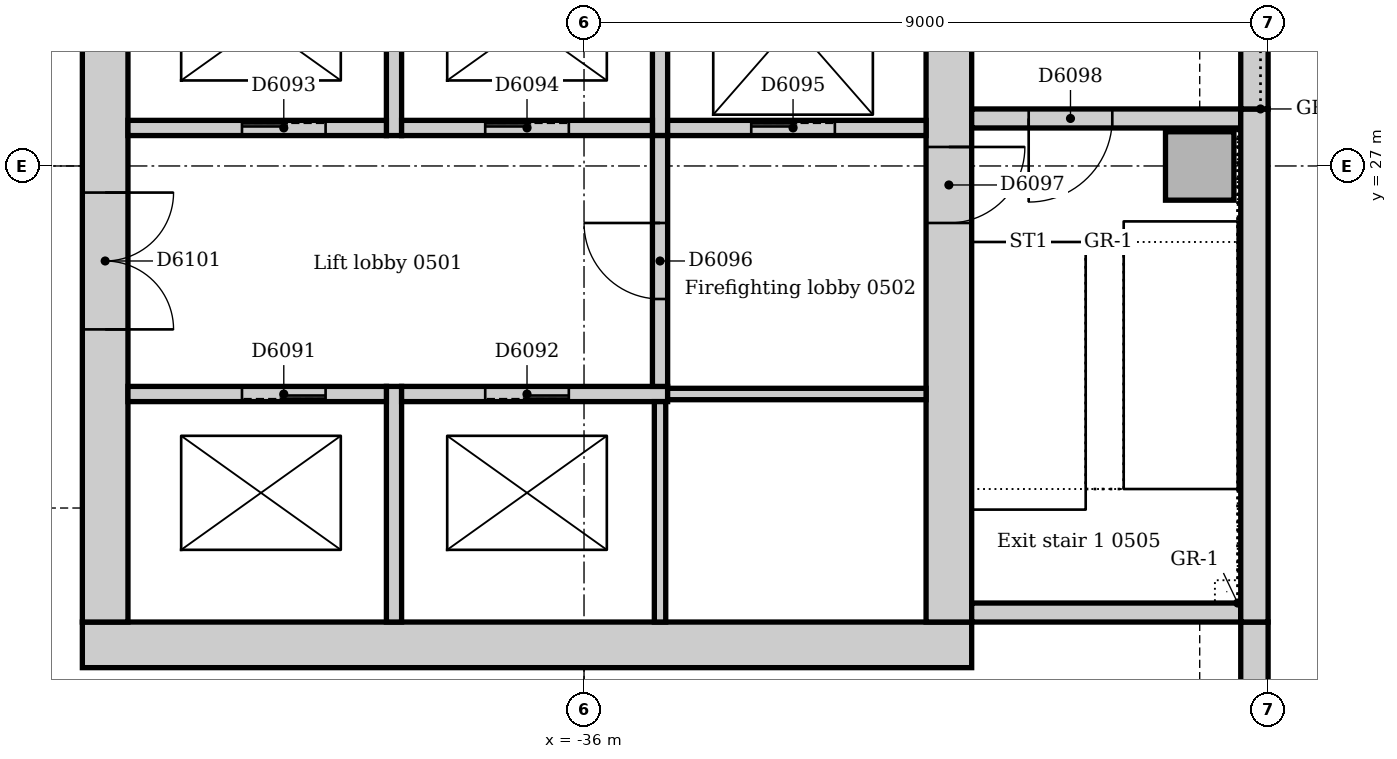
"""IFC4 building model, lengths in metres.
Left out: names, types, materials, properties, quantities, classifications, styles, units other than length and angle.
Written with IfcOpenShell. Run it as: python <this file> out.ifc"""

import sys

from ifc_helpers import new_model, si_unit, direction, frame, frame_2d, origin, origin_2d, place, context, subcontext, project, spatial, rectangle, extrude, element, fill, save


model = new_model("IFC4")
c1 = context("Model", 3, precision=1e-05, world=origin(), true_north=direction((0.0, 1.0)))
c2 = subcontext(c1, "Body", "Model", "MODEL_VIEW")
j1 = project(units=[si_unit("LENGTHUNIT", "METRE"), si_unit("PLANEANGLEUNIT", "RADIAN")], contexts=[c1])
p1 = place(None, origin())
s1 = spatial("IfcSite", under=j1, at=p1, CompositionType="ELEMENT")
p2 = place(p1, origin())
s2 = spatial("IfcBuilding", under=s1, at=p2, CompositionType="ELEMENT")
p3 = place(p2, frame((0.0, 0.0, 26.0)))
s3 = spatial("IfcBuildingStorey", under=s2, at=p3, CompositionType="ELEMENT", Elevation=26.0)
p4 = place(p3, frame((-42.6, 20.7, 0.0), z_axis=(0.0, 0.0, 1.0), x_axis=(1.0, 0.0, 0.0)))
e1 = element("IfcWall", 1, at=p4, inside=s3, PredefinedType="SOLIDWALL", context=c2, shape_type="SweptSolid", body=[
    extrude(rectangle(XDim=11.7, YDim=0.6, at=frame_2d((5.85, 0.0))), origin(), (0.0, 0.0, 1.0), 4.0),
])
p5 = place(p3, frame((-31.2, 21.0, 0.0), z_axis=(0.0, 0.0, 1.0), x_axis=(0.0, 1.0, 0.0)))
e2 = element("IfcWall", 2, at=p5, inside=s3, PredefinedType="SOLIDWALL", context=c2, shape_type="SweptSolid", body=[
    extrude(rectangle(XDim=9.5, YDim=0.6, at=frame_2d((4.75, 0.0))), origin(), (0.0, 0.0, 1.0), 4.0),
])
p6 = place(p5, frame((5.25, 0.0, 0.0)))
e3 = element("IfcOpeningElement", 3, at=p6, cuts=e2, PredefinedType="OPENING", context=c2, shape_type="SweptSolid", body=[
    extrude(rectangle(XDim=1.0, YDim=2.1, at=frame_2d((0.5, 1.05))), frame((0.0, 0.31, 0.0), z_axis=(0.0, -1.0, 0.0), x_axis=(1.0, 0.0, 0.0)), (0.0, 0.0, 1.0), 0.62),
])
p7 = place(p3, frame((-42.3, 30.5, 0.0), z_axis=(0.0, 0.0, 1.0), x_axis=(0.0, -1.0, 0.0)))
e4 = element("IfcWall", 4, at=p7, inside=s3, PredefinedType="SOLIDWALL", context=c2, shape_type="SweptSolid", body=[
    extrude(rectangle(XDim=9.5, YDim=0.6, at=frame_2d((4.75, 0.0))), origin(), (0.0, 0.0, 1.0), 4.0),
])
p8 = place(p7, frame((3.85, 0.0, 0.0)))
e5 = element("IfcOpeningElement", 5, at=p8, cuts=e4, PredefinedType="OPENING", context=c2, shape_type="SweptSolid", body=[
    extrude(rectangle(XDim=1.8, YDim=2.1, at=frame_2d((0.9, 1.05))), frame((0.0, 0.31, 0.0), z_axis=(0.0, -1.0, 0.0), x_axis=(1.0, 0.0, 0.0)), (0.0, 0.0, 1.0), 0.62),
])
p9 = place(p3, frame((-30.9, 21.125, 0.0), z_axis=(0.0, 0.0, 1.0), x_axis=(1.0, 0.0, 0.0)))
e6 = element("IfcWall", 6, at=p9, inside=s3, PredefinedType="SOLIDWALL", context=c2, shape_type="SweptSolid", body=[
    extrude(rectangle(XDim=3.54, YDim=0.25, at=frame_2d((1.77, 0.0))), origin(), (0.0, 0.0, 1.0), 4.0),
])
p10 = place(p3, frame((-27.36, 27.625, 0.0), z_axis=(0.0, 0.0, 1.0), x_axis=(-1.0, 0.0, 0.0)))
e7 = element("IfcWall", 7, at=p10, inside=s3, PredefinedType="SOLIDWALL", context=c2, shape_type="SweptSolid", body=[
    extrude(rectangle(XDim=3.54, YDim=0.25, at=frame_2d((1.77, 0.0))), origin(), (0.0, 0.0, 1.0), 4.0),
])
p11 = place(p10, frame((1.69, 0.0, 0.0)))
e8 = element("IfcOpeningElement", 8, at=p11, cuts=e7, PredefinedType="OPENING", context=c2, shape_type="SweptSolid", body=[
    extrude(rectangle(XDim=1.1, YDim=2.1, at=frame_2d((0.55, 1.05))), frame((0.0, 0.135, 0.0), z_axis=(0.0, -1.0, 0.0), x_axis=(1.0, 0.0, 0.0)), (0.0, 0.0, 1.0), 0.27),
])
p12 = place(p3, frame((-27.9, 27.0, 0.0), z_axis=(0.0, 0.0, 1.0), x_axis=(1.0, 0.0, 0.0)))
e9 = element("IfcColumn", 9, at=p12, inside=s3, PredefinedType="COLUMN", context=c2, shape_type="SweptSolid", body=[
    extrude(rectangle(XDim=0.9, YDim=0.9, at=origin_2d()), origin(), (0.0, 0.0, 1.0), 4.0),
])
p13 = place(p3, frame((-27.18, 8.743, 0.0), z_axis=(0.0, 0.0, 1.0), x_axis=(0.0, 1.0, 0.0)))
e10 = element("IfcWall", 10, at=p13, inside=s3, PredefinedType="STANDARD", context=c2, shape_type="SweptSolid", body=[
    extrude(rectangle(XDim=12.257, YDim=0.36, at=frame_2d((6.129, 0.0))), origin(), (0.0, 0.0, 1.0), 3.85),
])
p14 = place(p13, frame((2.607, 0.0, 0.9)))
e11 = element("IfcOpeningElement", 11, at=p14, cuts=e10, PredefinedType="OPENING", context=c2, shape_type="SweptSolid", body=[
    extrude(rectangle(XDim=3.3, YDim=1.6, at=frame_2d((1.65, 0.8))), frame((0.0, 0.19, 0.0), z_axis=(0.0, -1.0, 0.0), x_axis=(1.0, 0.0, 0.0)), (0.0, 0.0, 1.0), 0.38),
])
p15 = place(p13, frame((7.607, 0.0, 0.9)))
e12 = element("IfcOpeningElement", 12, at=p15, cuts=e10, PredefinedType="OPENING", context=c2, shape_type="SweptSolid", body=[
    extrude(rectangle(XDim=3.3, YDim=1.6, at=frame_2d((1.65, 0.8))), frame((0.0, 0.19, 0.0), z_axis=(0.0, -1.0, 0.0), x_axis=(1.0, 0.0, 0.0)), (0.0, 0.0, 1.0), 0.38),
])
p16 = place(p3, frame((-27.18, 21.0, 0.0), z_axis=(0.0, 0.0, 1.0), x_axis=(0.0, 1.0, 0.0)))
e13 = element("IfcWall", 13, at=p16, inside=s3, PredefinedType="STANDARD", context=c2, shape_type="SweptSolid", body=[
    extrude(rectangle(XDim=6.75, YDim=0.36, at=frame_2d((3.375, 0.0))), origin(), (0.0, 0.0, 1.0), 3.85),
])
p17 = place(p3, frame((-27.18, 27.75, 0.0), z_axis=(0.0, 0.0, 1.0), x_axis=(0.0, 1.0, 0.0)))
e14 = element("IfcWall", 14, at=p17, inside=s3, PredefinedType="STANDARD", context=c2, shape_type="SweptSolid", body=[
    extrude(rectangle(XDim=7.5, YDim=0.36, at=frame_2d((3.75, 0.0))), origin(), (0.0, 0.0, 1.0), 3.85),
])
p18 = place(p17, frame((2.85, 0.0, 1.2)))
e15 = element("IfcOpeningElement", 15, at=p18, cuts=e14, PredefinedType="OPENING", context=c2, shape_type="SweptSolid", body=[
    extrude(rectangle(XDim=1.8, YDim=1.2, at=frame_2d((0.9, 0.6))), frame((0.0, 0.19, 0.0), z_axis=(0.0, -1.0, 0.0), x_axis=(1.0, 0.0, 0.0)), (0.0, 0.0, 1.0), 0.38),
])
p19 = place(p3, frame((-38.5, 21.0, 0.0), z_axis=(0.0, 0.0, 1.0), x_axis=(0.0, 1.0, 0.0)))
e16 = element("IfcWall", 16, at=p19, inside=s3, PredefinedType="SOLIDWALL", context=c2, shape_type="SweptSolid", body=[
    extrude(rectangle(XDim=3.1, YDim=0.2, at=frame_2d((1.55, 0.0))), origin(), (0.0, 0.0, 1.0), 4.0),
])
p20 = place(p3, frame((-38.6, 24.0, 0.0), z_axis=(0.0, 0.0, 1.0), x_axis=(-1.0, 0.0, 0.0)))
e17 = element("IfcWall", 17, at=p20, inside=s3, PredefinedType="SOLIDWALL", context=c2, shape_type="SweptSolid", body=[
    extrude(rectangle(XDim=3.4, YDim=0.2, at=frame_2d((1.7, 0.0))), origin(), (0.0, 0.0, 1.0), 4.0),
])
p21 = place(p20, frame((0.8, 0.0, 0.0)))
e18 = element("IfcOpeningElement", 18, at=p21, cuts=e17, PredefinedType="OPENING", context=c2, shape_type="SweptSolid", body=[
    extrude(rectangle(XDim=1.1, YDim=2.1, at=frame_2d((0.55, 1.05))), frame((0.0, 0.11, 0.0), z_axis=(0.0, -1.0, 0.0), x_axis=(1.0, 0.0, 0.0)), (0.0, 0.0, 1.0), 0.22),
])
p22 = place(p3, frame((-34.9, 24.0, 0.0), z_axis=(0.0, 0.0, 1.0), x_axis=(-1.0, 0.0, 0.0)))
e19 = element("IfcWall", 19, at=p22, inside=s3, PredefinedType="SOLIDWALL", context=c2, shape_type="SweptSolid", body=[
    extrude(rectangle(XDim=3.5, YDim=0.2, at=frame_2d((1.75, 0.0))), origin(), (0.0, 0.0, 1.0), 4.0),
])
p23 = place(p22, frame((1.3, 0.0, 0.0)))
e20 = element("IfcOpeningElement", 20, at=p23, cuts=e19, PredefinedType="OPENING", context=c2, shape_type="SweptSolid", body=[
    extrude(rectangle(XDim=1.1, YDim=2.1, at=frame_2d((0.55, 1.05))), frame((0.0, 0.11, 0.0), z_axis=(0.0, -1.0, 0.0), x_axis=(1.0, 0.0, 0.0)), (0.0, 0.0, 1.0), 0.22),
])
p24 = place(p3, frame((-38.5, 27.4, 0.0), z_axis=(0.0, 0.0, 1.0), x_axis=(0.0, 1.0, 0.0)))
e21 = element("IfcWall", 21, at=p24, inside=s3, PredefinedType="SOLIDWALL", context=c2, shape_type="SweptSolid", body=[
    extrude(rectangle(XDim=2.85, YDim=0.2, at=frame_2d((1.425, 0.0))), origin(), (0.0, 0.0, 1.0), 4.0),
])
p25 = place(p3, frame((-42.0, 27.5, 0.0), z_axis=(0.0, 0.0, 1.0), x_axis=(1.0, 0.0, 0.0)))
e22 = element("IfcWall", 22, at=p25, inside=s3, PredefinedType="SOLIDWALL", context=c2, shape_type="SweptSolid", body=[
    extrude(rectangle(XDim=3.4, YDim=0.2, at=frame_2d((1.7, 0.0))), origin(), (0.0, 0.0, 1.0), 4.0),
])
p26 = place(p25, frame((1.5, 0.0, 0.0)))
e23 = element("IfcOpeningElement", 23, at=p26, cuts=e22, PredefinedType="OPENING", context=c2, shape_type="SweptSolid", body=[
    extrude(rectangle(XDim=1.1, YDim=2.1, at=frame_2d((0.55, 1.05))), frame((0.0, 0.11, 0.0), z_axis=(0.0, -1.0, 0.0), x_axis=(1.0, 0.0, 0.0)), (0.0, 0.0, 1.0), 0.22),
])
p27 = place(p3, frame((-35.0, 27.4, 0.0), z_axis=(0.0, 0.0, 1.0), x_axis=(0.0, 1.0, 0.0)))
e24 = element("IfcWall", 24, at=p27, inside=s3, PredefinedType="SOLIDWALL", context=c2, shape_type="SweptSolid", body=[
    extrude(rectangle(XDim=2.85, YDim=0.2, at=frame_2d((1.425, 0.0))), origin(), (0.0, 0.0, 1.0), 4.0),
])
p28 = place(p3, frame((-38.4, 27.5, 0.0), z_axis=(0.0, 0.0, 1.0), x_axis=(1.0, 0.0, 0.0)))
e25 = element("IfcWall", 25, at=p28, inside=s3, PredefinedType="SOLIDWALL", context=c2, shape_type="SweptSolid", body=[
    extrude(rectangle(XDim=3.3, YDim=0.2, at=frame_2d((1.65, 0.0))), origin(), (0.0, 0.0, 1.0), 4.0),
])
p29 = place(p28, frame((1.1, 0.0, 0.0)))
e26 = element("IfcOpeningElement", 26, at=p29, cuts=e25, PredefinedType="OPENING", context=c2, shape_type="SweptSolid", body=[
    extrude(rectangle(XDim=1.1, YDim=2.1, at=frame_2d((0.55, 1.05))), frame((0.0, 0.11, 0.0), z_axis=(0.0, -1.0, 0.0), x_axis=(1.0, 0.0, 0.0)), (0.0, 0.0, 1.0), 0.22),
])
p30 = place(p3, frame((-34.9, 27.5, 0.0), z_axis=(0.0, 0.0, 1.0), x_axis=(1.0, 0.0, 0.0)))
e27 = element("IfcWall", 27, at=p30, inside=s3, PredefinedType="SOLIDWALL", context=c2, shape_type="SweptSolid", body=[
    extrude(rectangle(XDim=3.4, YDim=0.2, at=frame_2d((1.7, 0.0))), origin(), (0.0, 0.0, 1.0), 4.0),
])
p31 = place(p30, frame((1.1, 0.0, 0.0)))
e28 = element("IfcOpeningElement", 28, at=p31, cuts=e27, PredefinedType="OPENING", context=c2, shape_type="SweptSolid", body=[
    extrude(rectangle(XDim=1.1, YDim=2.1, at=frame_2d((0.55, 1.05))), frame((0.0, 0.11, 0.0), z_axis=(0.0, -1.0, 0.0), x_axis=(1.0, 0.0, 0.0)), (0.0, 0.0, 1.0), 0.22),
])
p32 = place(p3, frame((-35.0, 24.1, 0.0), z_axis=(0.0, 0.0, 1.0), x_axis=(0.0, 1.0, 0.0)))
e29 = element("IfcWall", 29, at=p32, inside=s3, PredefinedType="SOLIDWALL", context=c2, shape_type="SweptSolid", body=[
    extrude(rectangle(XDim=3.3, YDim=0.2, at=frame_2d((1.65, 0.0))), origin(), (0.0, 0.0, 1.0), 4.0),
])
p33 = place(p32, frame((1.15, 0.0, 0.0)))
e30 = element("IfcOpeningElement", 30, at=p33, cuts=e29, PredefinedType="OPENING", context=c2, shape_type="SweptSolid", body=[
    extrude(rectangle(XDim=1.0, YDim=2.1, at=frame_2d((0.5, 1.05))), frame((0.0, 0.11, 0.0), z_axis=(0.0, -1.0, 0.0), x_axis=(1.0, 0.0, 0.0)), (0.0, 0.0, 1.0), 0.22),
])
p34 = place(p3, frame((-35.0, 21.0, 0.0), z_axis=(0.0, 0.0, 1.0), x_axis=(0.0, 1.0, 0.0)))
e31 = element("IfcWall", 31, at=p34, inside=s3, PredefinedType="SOLIDWALL", context=c2, shape_type="SweptSolid", body=[
    extrude(rectangle(XDim=2.9, YDim=0.15, at=frame_2d((1.45, 0.0))), origin(), (0.0, 0.0, 1.0), 4.0),
])
p35 = place(p3, frame((-31.5, 24.0, 0.0), z_axis=(0.0, 0.0, 1.0), x_axis=(-1.0, 0.0, 0.0)))
e32 = element("IfcWall", 32, at=p35, inside=s3, PredefinedType="SOLIDWALL", context=c2, shape_type="SweptSolid", body=[
    extrude(rectangle(XDim=3.4, YDim=0.15, at=frame_2d((1.7, 0.0))), origin(), (0.0, 0.0, 1.0), 4.0),
])
p36 = place(p21, origin())
e33 = element("IfcDoor", 33, at=p36, inside=s3, OperationType="SLIDING_TO_LEFT", PredefinedType="DOOR", context=c2, shape_type="SweptSolid", body=[
    extrude(rectangle(XDim=1.1, YDim=2.1, at=frame_2d((0.55, 1.05))), frame((0.0, 0.025, 0.0), z_axis=(0.0, -1.0, 0.0), x_axis=(1.0, 0.0, 0.0)), (0.0, 0.0, 1.0), 0.05),
])
fill(e18, e33)
p37 = place(p23, origin())
e34 = element("IfcDoor", 34, at=p37, inside=s3, OperationType="SLIDING_TO_LEFT", PredefinedType="DOOR", context=c2, shape_type="SweptSolid", body=[
    extrude(rectangle(XDim=1.1, YDim=2.1, at=frame_2d((0.55, 1.05))), frame((0.0, 0.025, 0.0), z_axis=(0.0, -1.0, 0.0), x_axis=(1.0, 0.0, 0.0)), (0.0, 0.0, 1.0), 0.05),
])
fill(e20, e34)
p38 = place(p26, origin())
e35 = element("IfcDoor", 35, at=p38, inside=s3, OperationType="SLIDING_TO_LEFT", PredefinedType="DOOR", context=c2, shape_type="SweptSolid", body=[
    extrude(rectangle(XDim=1.1, YDim=2.1, at=frame_2d((0.55, 1.05))), frame((0.0, 0.025, 0.0), z_axis=(0.0, -1.0, 0.0), x_axis=(1.0, 0.0, 0.0)), (0.0, 0.0, 1.0), 0.05),
])
fill(e23, e35)
p39 = place(p29, origin())
e36 = element("IfcDoor", 36, at=p39, inside=s3, OperationType="SLIDING_TO_LEFT", PredefinedType="DOOR", context=c2, shape_type="SweptSolid", body=[
    extrude(rectangle(XDim=1.1, YDim=2.1, at=frame_2d((0.55, 1.05))), frame((0.0, 0.025, 0.0), z_axis=(0.0, -1.0, 0.0), x_axis=(1.0, 0.0, 0.0)), (0.0, 0.0, 1.0), 0.05),
])
fill(e26, e36)
p40 = place(p31, origin())
e37 = element("IfcDoor", 37, at=p40, inside=s3, OperationType="SLIDING_TO_LEFT", PredefinedType="DOOR", context=c2, shape_type="SweptSolid", body=[
    extrude(rectangle(XDim=1.1, YDim=2.1, at=frame_2d((0.55, 1.05))), frame((0.0, 0.025, 0.0), z_axis=(0.0, -1.0, 0.0), x_axis=(1.0, 0.0, 0.0)), (0.0, 0.0, 1.0), 0.05),
])
fill(e28, e37)
p41 = place(p33, origin())
e38 = element("IfcDoor", 38, at=p41, inside=s3, OperationType="SINGLE_SWING_RIGHT", PredefinedType="DOOR", context=c2, shape_type="SweptSolid", body=[
    extrude(rectangle(XDim=1.0, YDim=2.1, at=frame_2d((0.5, 1.05))), frame((0.0, 0.025, 0.0), z_axis=(0.0, -1.0, 0.0), x_axis=(1.0, 0.0, 0.0)), (0.0, 0.0, 1.0), 0.05),
])
fill(e30, e38)
p42 = place(p6, frame((1.0, 0.0, 0.0), z_axis=(0.0, 0.0, 1.0), x_axis=(-1.0, 0.0, 0.0)))
e39 = element("IfcDoor", 39, at=p42, inside=s3, OperationType="SINGLE_SWING_LEFT", PredefinedType="DOOR", context=c2, shape_type="SweptSolid", body=[
    extrude(rectangle(XDim=1.0, YDim=2.1, at=frame_2d((0.5, 1.05))), frame((0.0, 0.025, 0.0), z_axis=(0.0, -1.0, 0.0), x_axis=(1.0, 0.0, 0.0)), (0.0, 0.0, 1.0), 0.05),
])
fill(e3, e39)
p43 = place(p11, origin())
e40 = element("IfcDoor", 40, at=p43, inside=s3, OperationType="SINGLE_SWING_RIGHT", PredefinedType="DOOR", context=c2, shape_type="SweptSolid", body=[
    extrude(rectangle(XDim=1.1, YDim=2.1, at=frame_2d((0.55, 1.05))), frame((0.0, 0.025, 0.0), z_axis=(0.0, -1.0, 0.0), x_axis=(1.0, 0.0, 0.0)), (0.0, 0.0, 1.0), 0.05),
])
fill(e8, e40)
p44 = place(p8, origin())
e41 = element("IfcDoor", 41, at=p44, inside=s3, OperationType="DOUBLE_DOOR_SINGLE_SWING", PredefinedType="DOOR", context=c2, shape_type="SweptSolid", body=[
    extrude(rectangle(XDim=1.8, YDim=2.1, at=frame_2d((0.9, 1.05))), frame((0.0, 0.025, 0.0), z_axis=(0.0, -1.0, 0.0), x_axis=(1.0, 0.0, 0.0)), (0.0, 0.0, 1.0), 0.05),
])
fill(e5, e41)
save(model, sys.argv[1])
